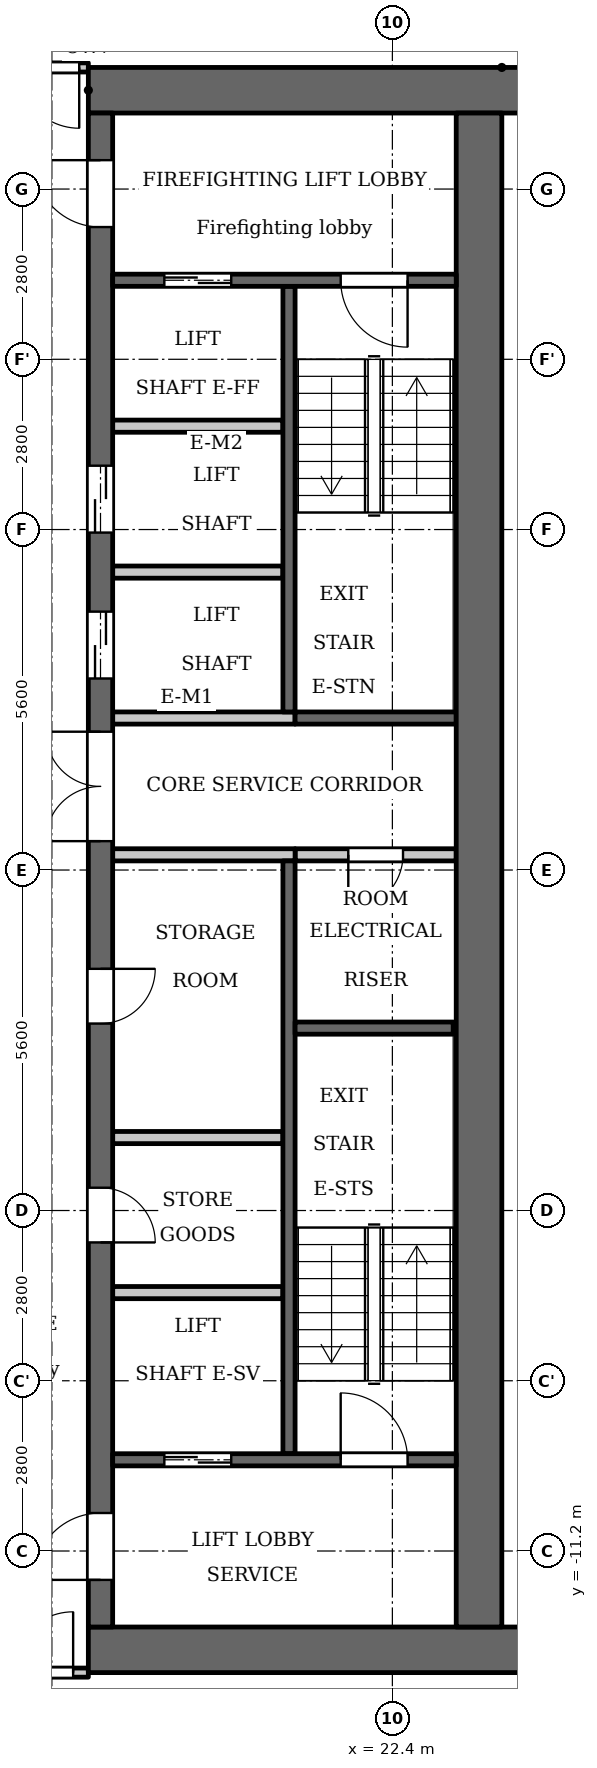
"""IFC4 building model, lengths in metres.
Left out: names, types, materials, properties, quantities, classifications, styles, units other than length and angle.
Written with IfcOpenShell. Run it as: python <this file> out.ifc"""

import sys

from ifc_helpers import new_model, si_unit, direction, frame, frame_2d, origin, place, context, subcontext, project, spatial, rectangle, extrude, element, fill, save


model = new_model("IFC4")
c1 = context("Model", 3, precision=1e-05, world=origin(), true_north=direction((0.0, 1.0)))
c2 = subcontext(c1, "Body", "Model", "MODEL_VIEW")
j1 = project(units=[si_unit("LENGTHUNIT", "METRE"), si_unit("PLANEANGLEUNIT", "RADIAN")], contexts=[c1])
p1 = place(None, origin())
s1 = spatial("IfcSite", under=j1, at=p1, CompositionType="ELEMENT")
p2 = place(p1, origin())
s2 = spatial("IfcBuilding", under=s1, at=p2, CompositionType="ELEMENT")
p3 = place(p2, frame((0.0, 0.0, 195.9)))
s3 = spatial("IfcBuildingStorey", under=s2, at=p3, CompositionType="ELEMENT", Elevation=195.9)
p4 = place(p3, frame((20.7, 2.6, 0.0), z_axis=(0.0, 0.0, 1.0), x_axis=(0.0, 1.0, 0.0)))
e1 = element("IfcWall", 1, at=p4, inside=s3, PredefinedType="SHEAR", context=c2, shape_type="SweptSolid", body=[
    extrude(rectangle(XDim=7.0, YDim=0.2, at=frame_2d((3.5, 0.0))), origin(), (0.0, 0.0, 1.0), 3.2),
])
p5 = place(p3, frame((20.7, -9.6, 0.0), z_axis=(0.0, 0.0, 1.0), x_axis=(0.0, 1.0, 0.0)))
e2 = element("IfcWall", 2, at=p5, inside=s3, PredefinedType="SHEAR", context=c2, shape_type="SweptSolid", body=[
    extrude(rectangle(XDim=9.75, YDim=0.2, at=frame_2d((4.875, 0.0))), origin(), (0.0, 0.0, 1.0), 3.2),
])
p6 = place(p3, frame((20.8, 2.5, 0.0), z_axis=(0.0, 0.0, 1.0), x_axis=(1.0, 0.0, 0.0)))
e3 = element("IfcWall", 3, at=p6, inside=s3, PredefinedType="SHEAR", context=c2, shape_type="SweptSolid", body=[
    extrude(rectangle(XDim=2.65, YDim=0.2, at=frame_2d((1.325, 0.0))), origin(), (0.0, 0.0, 1.0), 3.2),
])
p7 = place(p3, frame((20.8, 0.25, 0.0), z_axis=(0.0, 0.0, 1.0), x_axis=(1.0, 0.0, 0.0)))
e4 = element("IfcWall", 4, at=p7, inside=s3, PredefinedType="PARTITIONING", context=c2, shape_type="SweptSolid", body=[
    extrude(rectangle(XDim=2.65, YDim=0.2, at=frame_2d((1.325, 0.0))), origin(), (0.0, 0.0, 1.0), 3.2),
])
p8 = place(p7, frame((0.875, 0.0, 0.0)))
e5 = element("IfcOpeningElement", 5, at=p8, cuts=e4, PredefinedType="OPENING", context=c2, shape_type="SweptSolid", body=[
    extrude(rectangle(XDim=0.9, YDim=2.1, at=frame_2d((0.45, 1.05))), frame((0.0, 0.11, 0.0), z_axis=(0.0, -1.0, 0.0), x_axis=(1.0, 0.0, 0.0)), (0.0, 0.0, 1.0), 0.22),
])
for number, where, z_axis, x_axis in (
    (6, (17.4, 12.825, 0.0), (0.0, 0.0, 1.0), (1.0, 0.0, 0.0)),
    (7, (17.4, -12.825, 0.0), (0.0, 0.0, 1.0), (1.0, 0.0, 0.0)),
):
    element("IfcWall", number, at=place(p3, frame(where, z_axis=z_axis, x_axis=x_axis)), inside=s3, PredefinedType="SHEAR", context=c2, shape_type="SweptSolid", body=[
        extrude(rectangle(XDim=7.6, YDim=0.75, at=frame_2d((3.8, 0.0))), origin(), (0.0, 0.0, 1.0), 3.2),
    ])
p9 = place(p3, frame((17.8, -4.4, 0.0), z_axis=(0.0, 0.0, 1.0), x_axis=(1.0, 0.0, 0.0)))
e8 = element("IfcWall", 8, at=p9, inside=s3, PredefinedType="PARTITIONING", context=c2, shape_type="SweptSolid", body=[
    extrude(rectangle(XDim=2.8, YDim=0.2, at=frame_2d((1.4, 0.0))), origin(), (0.0, 0.0, 1.0), 3.2),
])
p10 = place(p3, frame((17.6, -12.45, 0.0), z_axis=(0.0, 0.0, 1.0), x_axis=(0.0, 1.0, 0.0)))
e9 = element("IfcWall", 9, at=p10, inside=s3, PredefinedType="SHEAR", context=c2, shape_type="SweptSolid", body=[
    extrude(rectangle(XDim=24.9, YDim=0.4, at=frame_2d((12.45, 0.0))), origin(), (0.0, 0.0, 1.0), 3.2),
])
p11 = place(p10, frame((6.325, 0.0, 0.0)))
e10 = element("IfcOpeningElement", 10, at=p11, cuts=e9, PredefinedType="OPENING", context=c2, shape_type="SweptSolid", body=[
    extrude(rectangle(XDim=0.9, YDim=2.1, at=frame_2d((0.45, 1.05))), frame((0.0, 0.21, 0.0), z_axis=(0.0, -1.0, 0.0), x_axis=(1.0, 0.0, 0.0)), (0.0, 0.0, 1.0), 0.42),
])
p12 = place(p10, frame((9.925, 0.0, 0.0)))
e11 = element("IfcOpeningElement", 11, at=p12, cuts=e9, PredefinedType="OPENING", context=c2, shape_type="SweptSolid", body=[
    extrude(rectangle(XDim=0.9, YDim=2.1, at=frame_2d((0.45, 1.05))), frame((0.0, 0.21, 0.0), z_axis=(0.0, -1.0, 0.0), x_axis=(1.0, 0.0, 0.0)), (0.0, 0.0, 1.0), 0.42),
])
p13 = place(p10, frame((15.6, 0.0, 0.0)))
e12 = element("IfcOpeningElement", 12, at=p13, cuts=e9, PredefinedType="OPENING", context=c2, shape_type="SweptSolid", body=[
    extrude(rectangle(XDim=1.1, YDim=2.1, at=frame_2d((0.55, 1.05))), frame((0.0, 0.21, 0.0), z_axis=(0.0, -1.0, 0.0), x_axis=(1.0, 0.0, 0.0)), (0.0, 0.0, 1.0), 0.42),
])
p14 = place(p10, frame((18.0, 0.0, 0.0)))
e13 = element("IfcOpeningElement", 13, at=p14, cuts=e9, PredefinedType="OPENING", context=c2, shape_type="SweptSolid", body=[
    extrude(rectangle(XDim=1.1, YDim=2.1, at=frame_2d((0.55, 1.05))), frame((0.0, 0.21, 0.0), z_axis=(0.0, -1.0, 0.0), x_axis=(1.0, 0.0, 0.0)), (0.0, 0.0, 1.0), 0.42),
])
p15 = place(p10, frame((23.025, 0.0, 0.0)))
e14 = element("IfcOpeningElement", 14, at=p15, cuts=e9, PredefinedType="OPENING", context=c2, shape_type="SweptSolid", body=[
    extrude(rectangle(XDim=1.1, YDim=2.1, at=frame_2d((0.55, 1.05))), frame((0.0, 0.21, 0.0), z_axis=(0.0, -1.0, 0.0), x_axis=(1.0, 0.0, 0.0)), (0.0, 0.0, 1.0), 0.42),
])
p16 = place(p10, frame((0.775, 0.0, 0.0)))
e15 = element("IfcOpeningElement", 15, at=p16, cuts=e9, PredefinedType="OPENING", context=c2, shape_type="SweptSolid", body=[
    extrude(rectangle(XDim=1.1, YDim=2.1, at=frame_2d((0.55, 1.05))), frame((0.0, 0.21, 0.0), z_axis=(0.0, -1.0, 0.0), x_axis=(1.0, 0.0, 0.0)), (0.0, 0.0, 1.0), 0.42),
])
p17 = place(p10, frame((12.925, 0.0, 0.0)))
e16 = element("IfcOpeningElement", 16, at=p17, cuts=e9, PredefinedType="OPENING", context=c2, shape_type="SweptSolid", body=[
    extrude(rectangle(XDim=1.8, YDim=2.1, at=frame_2d((0.9, 1.05))), frame((0.0, 0.21, 0.0), z_axis=(0.0, -1.0, 0.0), x_axis=(1.0, 0.0, 0.0)), (0.0, 0.0, 1.0), 0.42),
])
p18 = place(p3, frame((23.825, -12.45, 0.0), z_axis=(0.0, 0.0, 1.0), x_axis=(0.0, 1.0, 0.0)))
e17 = element("IfcWall", 17, at=p18, inside=s3, PredefinedType="SHEAR", context=c2, shape_type="SweptSolid", body=[
    extrude(rectangle(XDim=24.9, YDim=0.75, at=frame_2d((12.45, 0.0))), origin(), (0.0, 0.0, 1.0), 3.2),
])
p19 = place(p3, frame((17.8, -9.7, 0.0), z_axis=(0.0, 0.0, 1.0), x_axis=(1.0, 0.0, 0.0)))
e18 = element("IfcWall", 18, at=p19, inside=s3, PredefinedType="SHEAR", context=c2, shape_type="SweptSolid", body=[
    extrude(rectangle(XDim=5.65, YDim=0.2, at=frame_2d((2.825, 0.0))), origin(), (0.0, 0.0, 1.0), 3.2),
])
p20 = place(p19, frame((0.85, 0.0, 0.0)))
e19 = element("IfcOpeningElement", 19, at=p20, cuts=e18, PredefinedType="OPENING", context=c2, shape_type="SweptSolid", body=[
    extrude(rectangle(XDim=1.1, YDim=2.1, at=frame_2d((0.55, 1.05))), frame((0.0, 0.11, 0.0), z_axis=(0.0, -1.0, 0.0), x_axis=(1.0, 0.0, 0.0)), (0.0, 0.0, 1.0), 0.22),
])
p21 = place(p19, frame((3.75, 0.0, 0.0)))
e20 = element("IfcOpeningElement", 20, at=p21, cuts=e18, PredefinedType="OPENING", context=c2, shape_type="SweptSolid", body=[
    extrude(rectangle(XDim=1.1, YDim=2.1, at=frame_2d((0.55, 1.05))), frame((0.0, 0.11, 0.0), z_axis=(0.0, -1.0, 0.0), x_axis=(1.0, 0.0, 0.0)), (0.0, 0.0, 1.0), 0.22),
])
p22 = place(p3, frame((17.8, -6.95, 0.0), z_axis=(0.0, 0.0, 1.0), x_axis=(1.0, 0.0, 0.0)))
e21 = element("IfcWall", 21, at=p22, inside=s3, PredefinedType="PARTITIONING", context=c2, shape_type="SweptSolid", body=[
    extrude(rectangle(XDim=2.8, YDim=0.2, at=frame_2d((1.4, 0.0))), origin(), (0.0, 0.0, 1.0), 3.2),
])
for number, where, z_axis, x_axis in (
    (22, (17.8, 0.25, 0.0), (0.0, 0.0, 1.0), (1.0, 0.0, 0.0)),
    (23, (17.8, 2.5, 0.0), (0.0, 0.0, 1.0), (1.0, 0.0, 0.0)),
):
    element("IfcWall", number, at=place(p3, frame(where, z_axis=z_axis, x_axis=x_axis)), inside=s3, PredefinedType="PARTITIONING", context=c2, shape_type="SweptSolid", body=[
        extrude(rectangle(XDim=3.0, YDim=0.2, at=frame_2d((1.5, 0.0))), origin(), (0.0, 0.0, 1.0), 3.2),
    ])
for number, where, z_axis, x_axis in (
    (24, (17.8, 4.9, 0.0), (0.0, 0.0, 1.0), (1.0, 0.0, 0.0)),
    (25, (17.8, 7.3, 0.0), (0.0, 0.0, 1.0), (1.0, 0.0, 0.0)),
):
    element("IfcWall", number, at=place(p3, frame(where, z_axis=z_axis, x_axis=x_axis)), inside=s3, PredefinedType="PARTITIONING", context=c2, shape_type="SweptSolid", body=[
        extrude(rectangle(XDim=2.8, YDim=0.2, at=frame_2d((1.4, 0.0))), origin(), (0.0, 0.0, 1.0), 3.2),
    ])
p23 = place(p3, frame((17.8, 9.7, 0.0), z_axis=(0.0, 0.0, 1.0), x_axis=(1.0, 0.0, 0.0)))
e26 = element("IfcWall", 26, at=p23, inside=s3, PredefinedType="SHEAR", context=c2, shape_type="SweptSolid", body=[
    extrude(rectangle(XDim=5.65, YDim=0.2, at=frame_2d((2.825, 0.0))), origin(), (0.0, 0.0, 1.0), 3.2),
])
p24 = place(p23, frame((0.85, 0.0, 0.0)))
e27 = element("IfcOpeningElement", 27, at=p24, cuts=e26, PredefinedType="OPENING", context=c2, shape_type="SweptSolid", body=[
    extrude(rectangle(XDim=1.1, YDim=2.1, at=frame_2d((0.55, 1.05))), frame((0.0, 0.11, 0.0), z_axis=(0.0, -1.0, 0.0), x_axis=(1.0, 0.0, 0.0)), (0.0, 0.0, 1.0), 0.22),
])
p25 = place(p23, frame((3.75, 0.0, 0.0)))
e28 = element("IfcOpeningElement", 28, at=p25, cuts=e26, PredefinedType="OPENING", context=c2, shape_type="SweptSolid", body=[
    extrude(rectangle(XDim=1.1, YDim=2.1, at=frame_2d((0.55, 1.05))), frame((0.0, 0.11, 0.0), z_axis=(0.0, -1.0, 0.0), x_axis=(1.0, 0.0, 0.0)), (0.0, 0.0, 1.0), 0.22),
])
p26 = place(p3, frame((20.8, -2.6, 0.0), z_axis=(0.0, 0.0, 1.0), x_axis=(1.0, 0.0, 0.0)))
e29 = element("IfcWall", 29, at=p26, inside=s3, PredefinedType="SHEAR", context=c2, shape_type="SweptSolid", body=[
    extrude(rectangle(XDim=2.6, YDim=0.2, at=frame_2d((1.3, 0.0))), origin(), (0.0, 0.0, 1.0), 3.2),
])
p27 = place(p3, frame((-17.4, -13.2, 0.0), z_axis=(0.0, 0.0, 1.0), x_axis=(1.0, 0.0, 0.0)))
e30 = element("IfcWall", 30, at=p27, inside=s3, PredefinedType="PARTITIONING", context=c2, shape_type="SweptSolid", body=[
    extrude(rectangle(XDim=34.8, YDim=0.15, at=frame_2d((17.4, 0.0))), origin(), (0.0, 0.0, 1.0), 3.2),
])
p28 = place(p27, frame((0.15, 0.0, 0.0)))
e31 = element("IfcOpeningElement", 31, at=p28, cuts=e30, PredefinedType="OPENING", context=c2, shape_type="SweptSolid", body=[
    extrude(rectangle(XDim=1.0, YDim=2.1, at=frame_2d((0.5, 1.05))), frame((0.0, 0.085, 0.0), z_axis=(0.0, -1.0, 0.0), x_axis=(1.0, 0.0, 0.0)), (0.0, 0.0, 1.0), 0.17),
])
p29 = place(p27, frame((33.55, 0.0, 0.0)))
e32 = element("IfcOpeningElement", 32, at=p29, cuts=e30, PredefinedType="OPENING", context=c2, shape_type="SweptSolid", body=[
    extrude(rectangle(XDim=1.0, YDim=2.1, at=frame_2d((0.5, 1.05))), frame((0.0, 0.085, 0.0), z_axis=(0.0, -1.0, 0.0), x_axis=(1.0, 0.0, 0.0)), (0.0, 0.0, 1.0), 0.17),
])
p30 = place(p27, frame((15.7, 0.0, 0.0)))
e33 = element("IfcOpeningElement", 33, at=p30, cuts=e30, PredefinedType="OPENING", context=c2, shape_type="SweptSolid", body=[
    extrude(rectangle(XDim=1.0, YDim=2.1, at=frame_2d((0.5, 1.05))), frame((0.0, 0.085, 0.0), z_axis=(0.0, -1.0, 0.0), x_axis=(1.0, 0.0, 0.0)), (0.0, 0.0, 1.0), 0.17),
])
p31 = place(p27, frame((26.9, 0.0, 0.0)))
e34 = element("IfcOpeningElement", 34, at=p31, cuts=e30, PredefinedType="OPENING", context=c2, shape_type="SweptSolid", body=[
    extrude(rectangle(XDim=1.0, YDim=2.1, at=frame_2d((0.5, 1.05))), frame((0.0, 0.085, 0.0), z_axis=(0.0, -1.0, 0.0), x_axis=(1.0, 0.0, 0.0)), (0.0, 0.0, 1.0), 0.17),
])
p32 = place(p3, frame((-17.4, 13.2, 0.0), z_axis=(0.0, 0.0, 1.0), x_axis=(1.0, 0.0, 0.0)))
e35 = element("IfcWall", 35, at=p32, inside=s3, PredefinedType="PARTITIONING", context=c2, shape_type="SweptSolid", body=[
    extrude(rectangle(XDim=34.8, YDim=0.15, at=frame_2d((17.4, 0.0))), origin(), (0.0, 0.0, 1.0), 3.2),
])
p33 = place(p32, frame((0.25, 0.0, 0.0)))
e36 = element("IfcOpeningElement", 36, at=p33, cuts=e35, PredefinedType="OPENING", context=c2, shape_type="SweptSolid", body=[
    extrude(rectangle(XDim=1.0, YDim=2.1, at=frame_2d((0.5, 1.05))), frame((0.0, 0.085, 0.0), z_axis=(0.0, -1.0, 0.0), x_axis=(1.0, 0.0, 0.0)), (0.0, 0.0, 1.0), 0.17),
])
p34 = place(p32, frame((33.65, 0.0, 0.0)))
e37 = element("IfcOpeningElement", 37, at=p34, cuts=e35, PredefinedType="OPENING", context=c2, shape_type="SweptSolid", body=[
    extrude(rectangle(XDim=1.0, YDim=2.1, at=frame_2d((0.5, 1.05))), frame((0.0, 0.085, 0.0), z_axis=(0.0, -1.0, 0.0), x_axis=(1.0, 0.0, 0.0)), (0.0, 0.0, 1.0), 0.17),
])
p35 = place(p32, frame((10.15, 0.0, 0.0)))
e38 = element("IfcOpeningElement", 38, at=p35, cuts=e35, PredefinedType="OPENING", context=c2, shape_type="SweptSolid", body=[
    extrude(rectangle(XDim=1.0, YDim=2.1, at=frame_2d((0.5, 1.05))), frame((0.0, 0.085, 0.0), z_axis=(0.0, -1.0, 0.0), x_axis=(1.0, 0.0, 0.0)), (0.0, 0.0, 1.0), 0.17),
])
p36 = place(p32, frame((13.55, 0.0, 0.0)))
e39 = element("IfcOpeningElement", 39, at=p36, cuts=e35, PredefinedType="OPENING", context=c2, shape_type="SweptSolid", body=[
    extrude(rectangle(XDim=1.0, YDim=2.1, at=frame_2d((0.5, 1.05))), frame((0.0, 0.085, 0.0), z_axis=(0.0, -1.0, 0.0), x_axis=(1.0, 0.0, 0.0)), (0.0, 0.0, 1.0), 0.17),
])
p37 = place(p32, frame((20.85, 0.0, 0.0)))
e40 = element("IfcOpeningElement", 40, at=p37, cuts=e35, PredefinedType="OPENING", context=c2, shape_type="SweptSolid", body=[
    extrude(rectangle(XDim=1.0, YDim=2.1, at=frame_2d((0.5, 1.05))), frame((0.0, 0.085, 0.0), z_axis=(0.0, -1.0, 0.0), x_axis=(1.0, 0.0, 0.0)), (0.0, 0.0, 1.0), 0.17),
])
p38 = place(p32, frame((23.7, 0.0, 0.0)))
e41 = element("IfcOpeningElement", 41, at=p38, cuts=e35, PredefinedType="OPENING", context=c2, shape_type="SweptSolid", body=[
    extrude(rectangle(XDim=1.0, YDim=2.1, at=frame_2d((0.5, 1.05))), frame((0.0, 0.085, 0.0), z_axis=(0.0, -1.0, 0.0), x_axis=(1.0, 0.0, 0.0)), (0.0, 0.0, 1.0), 0.17),
])
p39 = place(p20, origin())
e42 = element("IfcDoor", 42, at=p39, inside=s3, OperationType="DOUBLE_DOOR_SLIDING", PredefinedType="DOOR", context=c2, shape_type="SweptSolid", body=[
    extrude(rectangle(XDim=1.1, YDim=2.1, at=frame_2d((0.55, 1.05))), frame((0.0, 0.025, 0.0), z_axis=(0.0, -1.0, 0.0), x_axis=(1.0, 0.0, 0.0)), (0.0, 0.0, 1.0), 0.05),
])
fill(e19, e42)
p40 = place(p11, origin())
e43 = element("IfcDoor", 43, at=p40, inside=s3, OperationType="SINGLE_SWING_LEFT", PredefinedType="DOOR", context=c2, shape_type="SweptSolid", body=[
    extrude(rectangle(XDim=0.9, YDim=2.1, at=frame_2d((0.45, 1.05))), frame((0.0, 0.025, 0.0), z_axis=(0.0, -1.0, 0.0), x_axis=(1.0, 0.0, 0.0)), (0.0, 0.0, 1.0), 0.05),
])
fill(e10, e43)
p41 = place(p12, origin())
e44 = element("IfcDoor", 44, at=p41, inside=s3, OperationType="SINGLE_SWING_RIGHT", PredefinedType="DOOR", context=c2, shape_type="SweptSolid", body=[
    extrude(rectangle(XDim=0.9, YDim=2.1, at=frame_2d((0.45, 1.05))), frame((0.0, 0.025, 0.0), z_axis=(0.0, -1.0, 0.0), x_axis=(1.0, 0.0, 0.0)), (0.0, 0.0, 1.0), 0.05),
])
fill(e11, e44)
p42 = place(p13, origin())
e45 = element("IfcDoor", 45, at=p42, inside=s3, OperationType="DOUBLE_DOOR_SLIDING", PredefinedType="DOOR", context=c2, shape_type="SweptSolid", body=[
    extrude(rectangle(XDim=1.1, YDim=2.1, at=frame_2d((0.55, 1.05))), frame((0.0, 0.025, 0.0), z_axis=(0.0, -1.0, 0.0), x_axis=(1.0, 0.0, 0.0)), (0.0, 0.0, 1.0), 0.05),
])
fill(e12, e45)
p43 = place(p14, origin())
e46 = element("IfcDoor", 46, at=p43, inside=s3, OperationType="DOUBLE_DOOR_SLIDING", PredefinedType="DOOR", context=c2, shape_type="SweptSolid", body=[
    extrude(rectangle(XDim=1.1, YDim=2.1, at=frame_2d((0.55, 1.05))), frame((0.0, 0.025, 0.0), z_axis=(0.0, -1.0, 0.0), x_axis=(1.0, 0.0, 0.0)), (0.0, 0.0, 1.0), 0.05),
])
fill(e13, e46)
p44 = place(p24, origin())
e47 = element("IfcDoor", 47, at=p44, inside=s3, OperationType="DOUBLE_DOOR_SLIDING", PredefinedType="DOOR", context=c2, shape_type="SweptSolid", body=[
    extrude(rectangle(XDim=1.1, YDim=2.1, at=frame_2d((0.55, 1.05))), frame((0.0, 0.025, 0.0), z_axis=(0.0, -1.0, 0.0), x_axis=(1.0, 0.0, 0.0)), (0.0, 0.0, 1.0), 0.05),
])
fill(e27, e47)
p45 = place(p15, origin())
e48 = element("IfcDoor", 48, at=p45, inside=s3, OperationType="SINGLE_SWING_LEFT", PredefinedType="DOOR", context=c2, shape_type="SweptSolid", body=[
    extrude(rectangle(XDim=1.1, YDim=2.1, at=frame_2d((0.55, 1.05))), frame((0.0, 0.025, 0.0), z_axis=(0.0, -1.0, 0.0), x_axis=(1.0, 0.0, 0.0)), (0.0, 0.0, 1.0), 0.05),
])
fill(e14, e48)
p46 = place(p16, origin())
e49 = element("IfcDoor", 49, at=p46, inside=s3, OperationType="SINGLE_SWING_RIGHT", PredefinedType="DOOR", context=c2, shape_type="SweptSolid", body=[
    extrude(rectangle(XDim=1.1, YDim=2.1, at=frame_2d((0.55, 1.05))), frame((0.0, 0.025, 0.0), z_axis=(0.0, -1.0, 0.0), x_axis=(1.0, 0.0, 0.0)), (0.0, 0.0, 1.0), 0.05),
])
fill(e15, e49)
p47 = place(p25, origin())
e50 = element("IfcDoor", 50, at=p47, inside=s3, OperationType="SINGLE_SWING_RIGHT", PredefinedType="DOOR", context=c2, shape_type="SweptSolid", body=[
    extrude(rectangle(XDim=1.1, YDim=2.1, at=frame_2d((0.55, 1.05))), frame((0.0, 0.025, 0.0), z_axis=(0.0, -1.0, 0.0), x_axis=(1.0, 0.0, 0.0)), (0.0, 0.0, 1.0), 0.05),
])
fill(e28, e50)
p48 = place(p21, origin())
e51 = element("IfcDoor", 51, at=p48, inside=s3, OperationType="SINGLE_SWING_RIGHT", PredefinedType="DOOR", context=c2, shape_type="SweptSolid", body=[
    extrude(rectangle(XDim=1.1, YDim=2.1, at=frame_2d((0.55, 1.05))), frame((0.0, 0.025, 0.0), z_axis=(0.0, -1.0, 0.0), x_axis=(1.0, 0.0, 0.0)), (0.0, 0.0, 1.0), 0.05),
])
fill(e20, e51)
p49 = place(p17, origin())
e52 = element("IfcDoor", 52, at=p49, inside=s3, OperationType="DOUBLE_DOOR_SINGLE_SWING", PredefinedType="DOOR", context=c2, shape_type="SweptSolid", body=[
    extrude(rectangle(XDim=1.8, YDim=2.1, at=frame_2d((0.9, 1.05))), frame((0.0, 0.025, 0.0), z_axis=(0.0, -1.0, 0.0), x_axis=(1.0, 0.0, 0.0)), (0.0, 0.0, 1.0), 0.05),
])
fill(e16, e52)
p50 = place(p8, origin())
e53 = element("IfcDoor", 53, at=p50, inside=s3, OperationType="SINGLE_SWING_LEFT", PredefinedType="DOOR", context=c2, shape_type="SweptSolid", body=[
    extrude(rectangle(XDim=0.9, YDim=2.1, at=frame_2d((0.45, 1.05))), frame((0.0, 0.025, 0.0), z_axis=(0.0, -1.0, 0.0), x_axis=(1.0, 0.0, 0.0)), (0.0, 0.0, 1.0), 0.05),
])
fill(e5, e53)
p51 = place(p34, origin())
e54 = element("IfcDoor", 54, at=p51, inside=s3, OperationType="SINGLE_SWING_RIGHT", PredefinedType="DOOR", context=c2, shape_type="SweptSolid", body=[
    extrude(rectangle(XDim=1.0, YDim=2.1, at=frame_2d((0.5, 1.05))), frame((0.0, 0.025, 0.0), z_axis=(0.0, -1.0, 0.0), x_axis=(1.0, 0.0, 0.0)), (0.0, 0.0, 1.0), 0.05),
])
fill(e37, e54)
p52 = place(p29, origin())
e55 = element("IfcDoor", 55, at=p52, inside=s3, OperationType="SINGLE_SWING_LEFT", PredefinedType="DOOR", context=c2, shape_type="SweptSolid", body=[
    extrude(rectangle(XDim=1.0, YDim=2.1, at=frame_2d((0.5, 1.05))), frame((0.0, 0.025, 0.0), z_axis=(0.0, -1.0, 0.0), x_axis=(1.0, 0.0, 0.0)), (0.0, 0.0, 1.0), 0.05),
])
fill(e32, e55)
save(model, sys.argv[1])
